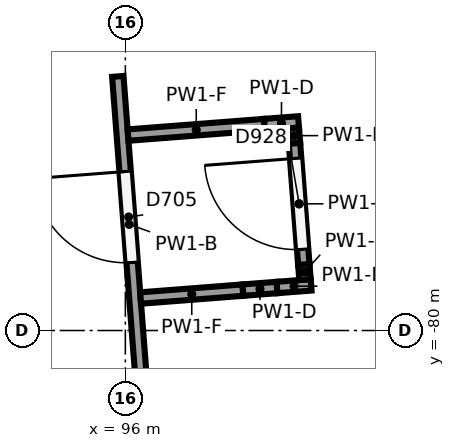
"""IFC4 building model, lengths in metres.
Left out: names, types, materials, properties, quantities, classifications, styles, units other than length and angle.
Written with IfcOpenShell. Run it as: python <this file> out.ifc"""

import sys

from ifc_helpers import new_model, si_unit, direction, frame, frame_2d, origin, place, context, subcontext, project, spatial, rectangle, extrude, element, fill, save


model = new_model("IFC4")
c1 = context("Model", 3, precision=1e-05, world=origin(), true_north=direction((0.0, 1.0)))
c2 = subcontext(c1, "Body", "Model", "MODEL_VIEW")
j1 = project(units=[si_unit("LENGTHUNIT", "METRE"), si_unit("PLANEANGLEUNIT", "RADIAN")], contexts=[c1])
p1 = place(None, origin())
s1 = spatial("IfcSite", under=j1, at=p1, CompositionType="ELEMENT")
p2 = place(p1, origin())
s2 = spatial("IfcBuilding", under=s1, at=p2, CompositionType="ELEMENT")
p3 = place(p2, frame((0.0, 0.0, 6.5)))
s3 = spatial("IfcBuildingStorey", under=s2, at=p3, CompositionType="ELEMENT", Elevation=6.5)
p4 = place(p3, frame((96.201, -80.55, 0.0), z_axis=(0.0, 0.0, 1.0), x_axis=(-0.076969034149, 0.997033483782, 0.0)))
e1 = element("IfcWall", 1, at=p4, inside=s3, PredefinedType="PARTITIONING", context=c2, shape_type="SweptSolid", body=[
    extrude(rectangle(XDim=3.905, YDim=0.15, at=frame_2d((1.952, 0.0))), origin(), (0.0, 0.0, 1.0), 5.05),
])
p5 = place(p4, frame((1.45, 0.0, 0.0)))
e2 = element("IfcOpeningElement", 2, at=p5, cuts=e1, PredefinedType="OPENING", context=c2, shape_type="SweptSolid", body=[
    extrude(rectangle(XDim=1.2, YDim=2.1, at=frame_2d((0.6, 1.05))), frame((0.0, 0.085, 0.0), z_axis=(0.0, -1.0, 0.0), x_axis=(1.0, 0.0, 0.0)), (0.0, 0.0, 1.0), 0.17),
])
p6 = place(p3, frame((96.201, -79.573, 0.0), z_axis=(0.0, 0.0, 1.0), x_axis=(0.997028903068, 0.077028348333, 0.0)))
e3 = element("IfcWall", 3, at=p6, inside=s3, PredefinedType="PARTITIONING", context=c2, shape_type="SweptSolid", body=[
    extrude(rectangle(XDim=1.35, YDim=0.15, at=frame_2d((0.675, 0.0))), origin(), (0.0, 0.0, 1.0), 5.1),
])
p7 = place(p3, frame((97.547, -79.469, 0.0), z_axis=(0.0, 0.0, 1.0), x_axis=(0.997070419096, 0.076489080029, 0.0)))
e4 = element("IfcWall", 4, at=p7, inside=s3, PredefinedType="PARTITIONING", context=c2, shape_type="SweptSolid", body=[
    extrude(rectangle(XDim=0.45, YDim=0.15, at=frame_2d((0.225, 0.0))), origin(), (0.0, 0.0, 1.0), 3.85),
])
p8 = place(p3, frame((97.996, -79.434, 0.0), z_axis=(0.0, 0.0, 1.0), x_axis=(0.997025681882, 0.077070030935, 0.0)))
e5 = element("IfcWall", 5, at=p8, inside=s3, PredefinedType="PARTITIONING", context=c2, shape_type="SweptSolid", body=[
    extrude(rectangle(XDim=0.45, YDim=0.15, at=frame_2d((0.225, 0.0))), origin(), (0.0, 0.0, 1.0), 3.85),
])
p9 = place(p3, frame((96.035, -77.429, 0.0), z_axis=(0.0, 0.0, 1.0), x_axis=(0.997028098262, 0.077038764768, 0.0)))
e6 = element("IfcWall", 6, at=p9, inside=s3, PredefinedType="PARTITIONING", context=c2, shape_type="SweptSolid", body=[
    extrude(rectangle(XDim=1.8, YDim=0.15, at=frame_2d((0.9, 0.0))), origin(), (0.0, 0.0, 1.0), 5.1),
])
p10 = place(p3, frame((97.83, -77.29, 0.0), z_axis=(0.0, 0.0, 1.0), x_axis=(0.997028903068, 0.077028348333, 0.0)))
e7 = element("IfcWall", 7, at=p10, inside=s3, PredefinedType="PARTITIONING", context=c2, shape_type="SweptSolid", body=[
    extrude(rectangle(XDim=0.45, YDim=0.15, at=frame_2d((0.225, 0.0))), origin(), (0.0, 0.0, 1.0), 3.85),
])
p11 = place(p3, frame((98.364, -79.33, 0.0), z_axis=(0.0, 0.0, 1.0), x_axis=(-0.076883141957, 0.997040110769, 0.0)))
e8 = element("IfcWall", 8, at=p11, inside=s3, PredefinedType="PARTITIONING", context=c2, shape_type="SweptSolid", body=[
    extrude(rectangle(XDim=0.2, YDim=0.15, at=frame_2d((0.1, 0.0))), origin(), (0.0, 0.0, 1.0), 3.85),
])
p12 = place(p3, frame((98.348, -79.131, 0.0), z_axis=(0.0, 0.0, 1.0), x_axis=(-0.076906536042, 0.997038306543, 0.0)))
e9 = element("IfcWall", 9, at=p12, inside=s3, PredefinedType="PARTITIONING", context=c2, shape_type="SweptSolid", body=[
    extrude(rectangle(XDim=1.6, YDim=0.15, at=frame_2d((0.8, 0.0))), origin(), (0.0, 0.0, 1.0), 3.85),
])
p13 = place(p12, frame((0.2, 0.0, 0.0)))
e10 = element("IfcOpeningElement", 10, at=p13, cuts=e9, PredefinedType="OPENING", context=c2, shape_type="SweptSolid", body=[
    extrude(rectangle(XDim=1.2, YDim=2.1, at=frame_2d((0.6, 1.05))), frame((0.0, 0.085, 0.0), z_axis=(0.0, -1.0, 0.0), x_axis=(1.0, 0.0, 0.0)), (0.0, 0.0, 1.0), 0.17),
])
p14 = place(p3, frame((98.225, -77.536, 0.0), z_axis=(0.0, 0.0, 1.0), x_axis=(-0.076883141957, 0.997040110769, 0.0)))
e11 = element("IfcWall", 11, at=p14, inside=s3, PredefinedType="PARTITIONING", context=c2, shape_type="SweptSolid", body=[
    extrude(rectangle(XDim=0.2, YDim=0.15, at=frame_2d((0.1, 0.0))), origin(), (0.0, 0.0, 1.0), 3.85),
])
p15 = place(p5, origin())
e12 = element("IfcDoor", 12, at=p15, inside=s3, OperationType="SINGLE_SWING_RIGHT", PredefinedType="DOOR", context=c2, shape_type="SweptSolid", body=[
    extrude(rectangle(XDim=1.2, YDim=2.1, at=frame_2d((0.6, 1.05))), frame((0.0, 0.025, 0.0), z_axis=(0.0, -1.0, 0.0), x_axis=(1.0, 0.0, 0.0)), (0.0, 0.0, 1.0), 0.05),
])
fill(e2, e12)
p16 = place(p13, origin())
e13 = element("IfcDoor", 13, at=p16, inside=s3, OperationType="SINGLE_SWING_RIGHT", PredefinedType="DOOR", context=c2, shape_type="SweptSolid", body=[
    extrude(rectangle(XDim=1.2, YDim=2.1, at=frame_2d((0.6, 1.05))), frame((0.0, 0.025, 0.0), z_axis=(0.0, -1.0, 0.0), x_axis=(1.0, 0.0, 0.0)), (0.0, 0.0, 1.0), 0.05),
])
fill(e10, e13)
save(model, sys.argv[1])
